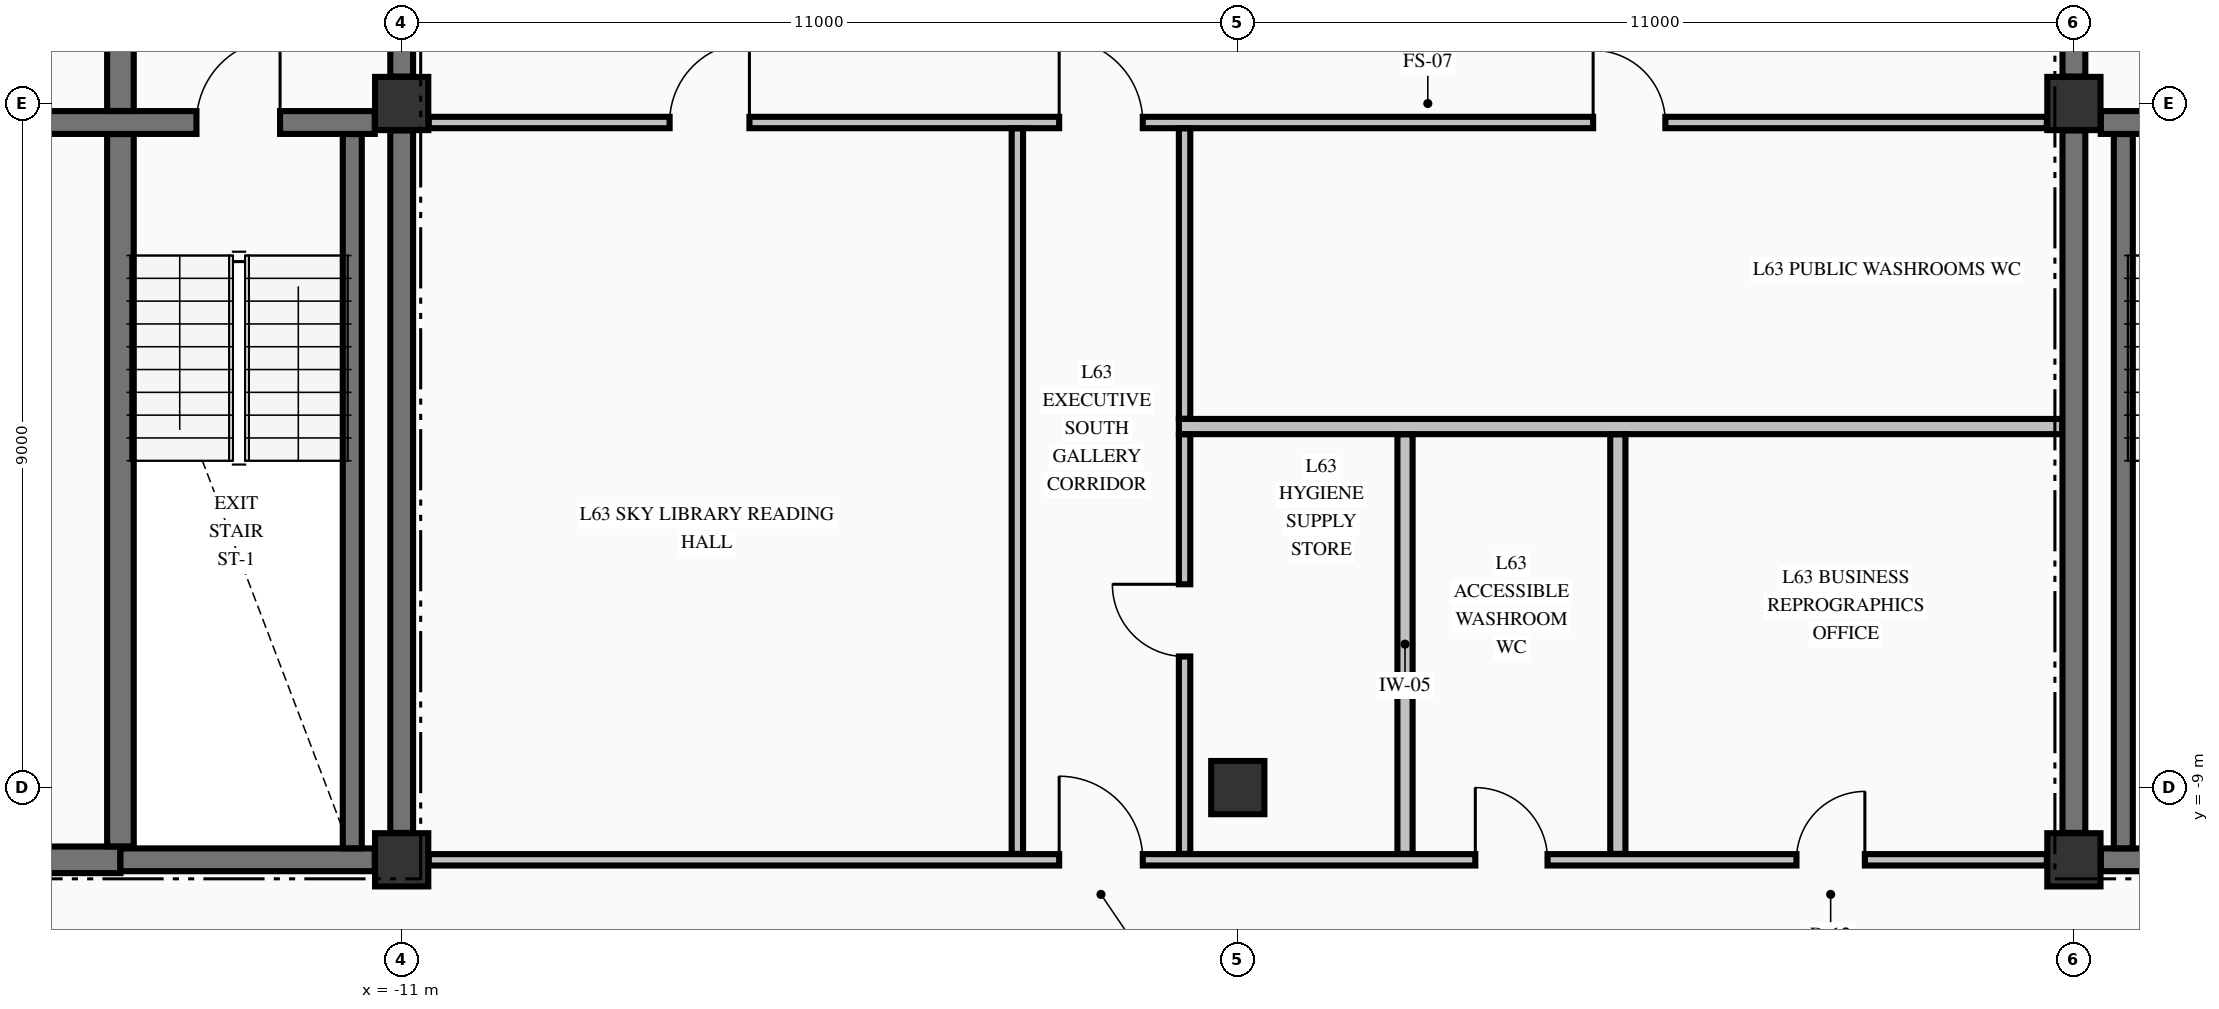
"""IFC4 building model, lengths in metres.
Left out: names, types, materials, properties, quantities, classifications, styles, units other than length and angle.
Written with IfcOpenShell. Run it as: python <this file> out.ifc"""

import sys

from ifc_helpers import new_model, si_unit, direction, frame, frame_2d, origin, origin_2d, place, context, subcontext, project, spatial, rectangle, extrude, element, fill, save


model = new_model("IFC4")
c1 = context("Model", 3, precision=1e-05, world=origin(), true_north=direction((0.0, 1.0)))
c2 = subcontext(c1, "Body", "Model", "MODEL_VIEW")
j1 = project(units=[si_unit("LENGTHUNIT", "METRE"), si_unit("PLANEANGLEUNIT", "RADIAN")], contexts=[c1])
p1 = place(None, origin())
s1 = spatial("IfcSite", under=j1, at=p1, CompositionType="ELEMENT")
p2 = place(p1, origin())
s2 = spatial("IfcBuilding", under=s1, at=p2, CompositionType="ELEMENT")
p3 = place(p2, frame((0.0, 0.0, 239.74)))
s3 = spatial("IfcBuildingStorey", under=s2, at=p3, CompositionType="ELEMENT", Elevation=239.74)
for number, where, z_axis, x_axis in (
    (1, (-11.0, -9.95, -0.25), (0.0, 0.0, 1.0), (1.0, 0.0, 0.0)),
    (2, (-11.0, 0.0, -0.25), (0.0, 0.0, 1.0), (1.0, 0.0, 0.0)),
    (3, (11.0, -9.95, -0.25), (0.0, 0.0, 1.0), (1.0, 0.0, 0.0)),
    (4, (11.0, 0.0, -0.25), (0.0, 0.0, 1.0), (1.0, 0.0, 0.0)),
    (5, (0.0, -9.0, -0.25), (0.0, 0.0, 1.0), (1.0, 0.0, 0.0)),
):
    element("IfcColumn", number, at=place(p3, frame(where, z_axis=z_axis, x_axis=x_axis)), inside=s3, PredefinedType="COLUMN", context=c2, shape_type="SweptSolid", body=[
        extrude(rectangle(XDim=0.7, YDim=0.7, at=origin_2d()), origin(), (0.0, 0.0, 1.0), 3.23),
    ])
p4 = place(p3, frame((-19.646, -9.95, 0.0), z_axis=(0.0, 0.0, 1.0), x_axis=(1.0, 0.0, 0.0)))
e6 = element("IfcWall", 6, at=p4, inside=s3, PredefinedType="SHEAR", context=c2, shape_type="SweptSolid", body=[
    extrude(rectangle(XDim=4.946, YDim=0.35, at=frame_2d((2.473, 0.0))), origin(), (0.0, 0.0, 1.0), 2.98),
])
p5 = place(p4, frame((0.821, 0.0, 0.0)))
e7 = element("IfcOpeningElement", 7, at=p5, cuts=e6, PredefinedType="OPENING", context=c2, shape_type="SweptSolid", body=[
    extrude(rectangle(XDim=1.05, YDim=2.15, at=frame_2d((0.525, 1.075))), frame((0.0, 0.185, 0.0), z_axis=(0.0, -1.0, 0.0), x_axis=(1.0, 0.0, 0.0)), (0.0, 0.0, 1.0), 0.37),
])
for number, where, z_axis, x_axis in (
    (8, (-14.7, -9.95, 0.0), (0.0, 0.0, 1.0), (1.0, 0.0, 0.0)),
    (9, (11.354, -9.95, 0.0), (0.0, 0.0, 1.0), (1.0, 0.0, 0.0)),
):
    element("IfcWall", number, at=place(p3, frame(where, z_axis=z_axis, x_axis=x_axis)), inside=s3, PredefinedType="SHEAR", context=c2, shape_type="SweptSolid", body=[
        extrude(rectangle(XDim=3.346, YDim=0.3, at=frame_2d((1.673, 0.0))), origin(), (0.0, 0.0, 1.0), 2.98),
    ])
p6 = place(p3, frame((-20.571, -0.25, 0.0), z_axis=(0.0, 0.0, 1.0), x_axis=(1.0, 0.0, 0.0)))
e10 = element("IfcWall", 10, at=p6, inside=s3, PredefinedType="SHEAR", context=c2, shape_type="SweptSolid", body=[
    extrude(rectangle(XDim=9.217, YDim=0.3, at=frame_2d((4.608, 0.0))), origin(), (0.0, 0.0, 1.0), 2.98),
])
p7 = place(p6, frame((6.871, 0.0, 0.0)))
e11 = element("IfcOpeningElement", 11, at=p7, cuts=e10, PredefinedType="OPENING", context=c2, shape_type="SweptSolid", body=[
    extrude(rectangle(XDim=1.1, YDim=2.15, at=frame_2d((0.55, 1.075))), frame((0.0, 0.16, 0.0), z_axis=(0.0, -1.0, 0.0), x_axis=(1.0, 0.0, 0.0)), (0.0, 0.0, 1.0), 0.32),
])
p8 = place(p3, frame((11.354, -0.25, 0.0), z_axis=(0.0, 0.0, 1.0), x_axis=(1.0, 0.0, 0.0)))
e12 = element("IfcWall", 12, at=p8, inside=s3, PredefinedType="SHEAR", context=c2, shape_type="SweptSolid", body=[
    extrude(rectangle(XDim=3.521, YDim=0.3, at=frame_2d((1.76, 0.0))), origin(), (0.0, 0.0, 1.0), 2.98),
])
p9 = place(p8, frame((1.246, 0.0, 0.0)))
e13 = element("IfcOpeningElement", 13, at=p9, cuts=e12, PredefinedType="OPENING", context=c2, shape_type="SweptSolid", body=[
    extrude(rectangle(XDim=1.1, YDim=2.15, at=frame_2d((0.55, 1.075))), frame((0.0, 0.16, 0.0), z_axis=(0.0, -1.0, 0.0), x_axis=(1.0, 0.0, 0.0)), (0.0, 0.0, 1.0), 0.32),
])
p10 = place(p3, frame((-10.644, -9.95, 0.0), z_axis=(0.0, 0.0, 1.0), x_axis=(1.0, 0.0, 0.0)))
e14 = element("IfcWall", 14, at=p10, inside=s3, PredefinedType="PARTITIONING", context=c2, shape_type="SweptSolid", body=[
    extrude(rectangle(XDim=21.288, YDim=0.15, at=frame_2d((10.644, 0.0))), origin(), (0.0, 0.0, 1.0), 2.98),
])
p11 = place(p10, frame((8.294, 0.0, 0.0)))
e15 = element("IfcOpeningElement", 15, at=p11, cuts=e14, PredefinedType="OPENING", context=c2, shape_type="SweptSolid", body=[
    extrude(rectangle(XDim=1.1, YDim=2.15, at=frame_2d((0.55, 1.075))), frame((0.0, 0.085, 0.0), z_axis=(0.0, -1.0, 0.0), x_axis=(1.0, 0.0, 0.0)), (0.0, 0.0, 1.0), 0.17),
])
p12 = place(p10, frame((13.769, 0.0, 0.0)))
e16 = element("IfcOpeningElement", 16, at=p12, cuts=e14, PredefinedType="OPENING", context=c2, shape_type="SweptSolid", body=[
    extrude(rectangle(XDim=0.95, YDim=2.15, at=frame_2d((0.475, 1.075))), frame((0.0, 0.085, 0.0), z_axis=(0.0, -1.0, 0.0), x_axis=(1.0, 0.0, 0.0)), (0.0, 0.0, 1.0), 0.17),
])
p13 = place(p10, frame((17.994, 0.0, 0.0)))
e17 = element("IfcOpeningElement", 17, at=p13, cuts=e14, PredefinedType="OPENING", context=c2, shape_type="SweptSolid", body=[
    extrude(rectangle(XDim=0.9, YDim=2.15, at=frame_2d((0.45, 1.075))), frame((0.0, 0.085, 0.0), z_axis=(0.0, -1.0, 0.0), x_axis=(1.0, 0.0, 0.0)), (0.0, 0.0, 1.0), 0.17),
])
p14 = place(p3, frame((-0.775, -4.25, 0.0), z_axis=(0.0, 0.0, 1.0), x_axis=(1.0, 0.0, 0.0)))
e18 = element("IfcWall", 18, at=p14, inside=s3, PredefinedType="PARTITIONING", context=c2, shape_type="SweptSolid", body=[
    extrude(rectangle(XDim=11.622, YDim=0.2, at=frame_2d((5.811, 0.0))), origin(), (0.0, 0.0, 1.0), 2.98),
])
p15 = place(p3, frame((-10.644, -0.25, 0.0), z_axis=(0.0, 0.0, 1.0), x_axis=(1.0, 0.0, 0.0)))
e19 = element("IfcWall", 19, at=p15, inside=s3, PredefinedType="PARTITIONING", context=c2, shape_type="SweptSolid", body=[
    extrude(rectangle(XDim=21.288, YDim=0.15, at=frame_2d((10.644, 0.0))), origin(), (0.0, 0.0, 1.0), 2.98),
])
p16 = place(p15, frame((8.294, 0.0, 0.0)))
e20 = element("IfcOpeningElement", 20, at=p16, cuts=e19, PredefinedType="OPENING", context=c2, shape_type="SweptSolid", body=[
    extrude(rectangle(XDim=1.1, YDim=2.15, at=frame_2d((0.55, 1.075))), frame((0.0, 0.085, 0.0), z_axis=(0.0, -1.0, 0.0), x_axis=(1.0, 0.0, 0.0)), (0.0, 0.0, 1.0), 0.17),
])
p17 = place(p15, frame((3.169, 0.0, 0.0)))
e21 = element("IfcOpeningElement", 21, at=p17, cuts=e19, PredefinedType="OPENING", context=c2, shape_type="SweptSolid", body=[
    extrude(rectangle(XDim=1.05, YDim=2.15, at=frame_2d((0.525, 1.075))), frame((0.0, 0.085, 0.0), z_axis=(0.0, -1.0, 0.0), x_axis=(1.0, 0.0, 0.0)), (0.0, 0.0, 1.0), 0.17),
])
p18 = place(p15, frame((15.319, 0.0, 0.0)))
e22 = element("IfcOpeningElement", 22, at=p18, cuts=e19, PredefinedType="OPENING", context=c2, shape_type="SweptSolid", body=[
    extrude(rectangle(XDim=0.95, YDim=2.15, at=frame_2d((0.475, 1.075))), frame((0.0, 0.085, 0.0), z_axis=(0.0, -1.0, 0.0), x_axis=(1.0, 0.0, 0.0)), (0.0, 0.0, 1.0), 0.17),
])
p19 = place(p3, frame((-14.7, -9.773, 0.0), z_axis=(0.0, 0.0, 1.0), x_axis=(0.0, 1.0, 0.0)))
e23 = element("IfcWall", 23, at=p19, inside=s3, PredefinedType="SHEAR", context=c2, shape_type="SweptSolid", body=[
    extrude(rectangle(XDim=9.371, YDim=0.35, at=frame_2d((4.686, 0.0))), origin(), (0.0, 0.0, 1.0), 2.98),
])
p20 = place(p3, frame((-14.7, -0.098, 0.0), z_axis=(0.0, 0.0, 1.0), x_axis=(0.0, 1.0, 0.0)))
e24 = element("IfcWall", 24, at=p20, inside=s3, PredefinedType="SHEAR", context=c2, shape_type="SweptSolid", body=[
    extrude(rectangle(XDim=2.846, YDim=0.35, at=frame_2d((1.423, 0.0))), origin(), (0.0, 0.0, 1.0), 2.98),
])
p21 = place(p3, frame((-11.65, -9.798, 0.0), z_axis=(0.0, 0.0, 1.0), x_axis=(0.0, 1.0, 0.0)))
e25 = element("IfcWall", 25, at=p21, inside=s3, PredefinedType="SOLIDWALL", context=c2, shape_type="SweptSolid", body=[
    extrude(rectangle(XDim=9.396, YDim=0.25, at=frame_2d((4.698, 0.0))), origin(), (0.0, 0.0, 1.0), 2.98),
])
p22 = place(p3, frame((-11.0, -9.596, 0.0), z_axis=(0.0, 0.0, 1.0), x_axis=(0.0, 1.0, 0.0)))
e26 = element("IfcWall", 26, at=p22, inside=s3, PredefinedType="SHEAR", context=c2, shape_type="SweptSolid", body=[
    extrude(rectangle(XDim=9.242, YDim=0.3, at=frame_2d((4.621, 0.0))), origin(), (0.0, 0.0, 1.0), 2.98),
])
p23 = place(p3, frame((-11.0, 0.354, 0.0), z_axis=(0.0, 0.0, 1.0), x_axis=(0.0, 1.0, 0.0)))
e27 = element("IfcWall", 27, at=p23, inside=s3, PredefinedType="SHEAR", context=c2, shape_type="SweptSolid", body=[
    extrude(rectangle(XDim=2.394, YDim=0.3, at=frame_2d((1.197, 0.0))), origin(), (0.0, 0.0, 1.0), 2.98),
])
p24 = place(p23, frame((0.746, 0.0, 0.0)))
e28 = element("IfcOpeningElement", 28, at=p24, cuts=e27, PredefinedType="OPENING", context=c2, shape_type="SweptSolid", body=[
    extrude(rectangle(XDim=1.1, YDim=2.15, at=frame_2d((0.55, 1.075))), frame((0.0, 0.16, 0.0), z_axis=(0.0, -1.0, 0.0), x_axis=(1.0, 0.0, 0.0)), (0.0, 0.0, 1.0), 0.32),
])
p25 = place(p3, frame((11.0, -9.596, 0.0), z_axis=(0.0, 0.0, 1.0), x_axis=(0.0, 1.0, 0.0)))
e29 = element("IfcWall", 29, at=p25, inside=s3, PredefinedType="SHEAR", context=c2, shape_type="SweptSolid", body=[
    extrude(rectangle(XDim=9.242, YDim=0.3, at=frame_2d((4.621, 0.0))), origin(), (0.0, 0.0, 1.0), 2.98),
])
p26 = place(p3, frame((11.0, 0.354, 0.0), z_axis=(0.0, 0.0, 1.0), x_axis=(0.0, 1.0, 0.0)))
e30 = element("IfcWall", 30, at=p26, inside=s3, PredefinedType="SHEAR", context=c2, shape_type="SweptSolid", body=[
    extrude(rectangle(XDim=2.394, YDim=0.3, at=frame_2d((1.197, 0.0))), origin(), (0.0, 0.0, 1.0), 2.98),
])
p27 = place(p26, frame((0.746, 0.0, 0.0)))
e31 = element("IfcOpeningElement", 31, at=p27, cuts=e30, PredefinedType="OPENING", context=c2, shape_type="SweptSolid", body=[
    extrude(rectangle(XDim=1.1, YDim=2.15, at=frame_2d((0.55, 1.075))), frame((0.0, 0.16, 0.0), z_axis=(0.0, -1.0, 0.0), x_axis=(1.0, 0.0, 0.0)), (0.0, 0.0, 1.0), 0.32),
])
p28 = place(p3, frame((11.65, -9.798, 0.0), z_axis=(0.0, 0.0, 1.0), x_axis=(0.0, 1.0, 0.0)))
e32 = element("IfcWall", 32, at=p28, inside=s3, PredefinedType="SOLIDWALL", context=c2, shape_type="SweptSolid", body=[
    extrude(rectangle(XDim=9.396, YDim=0.25, at=frame_2d((4.698, 0.0))), origin(), (0.0, 0.0, 1.0), 2.98),
])
p29 = place(p3, frame((-2.9, -9.872, 0.0), z_axis=(0.0, 0.0, 1.0), x_axis=(0.0, 1.0, 0.0)))
e33 = element("IfcWall", 33, at=p29, inside=s3, PredefinedType="PARTITIONING", context=c2, shape_type="SweptSolid", body=[
    extrude(rectangle(XDim=9.544, YDim=0.15, at=frame_2d((4.772, 0.0))), origin(), (0.0, 0.0, 1.0), 2.98),
])
p30 = place(p3, frame((-0.7, -9.872, 0.0), z_axis=(0.0, 0.0, 1.0), x_axis=(0.0, 1.0, 0.0)))
e34 = element("IfcWall", 34, at=p30, inside=s3, PredefinedType="PARTITIONING", context=c2, shape_type="SweptSolid", body=[
    extrude(rectangle(XDim=5.519, YDim=0.15, at=frame_2d((2.76, 0.0))), origin(), (0.0, 0.0, 1.0), 2.98),
])
p31 = place(p30, frame((2.597, 0.0, 0.0)))
e35 = element("IfcOpeningElement", 35, at=p31, cuts=e34, PredefinedType="OPENING", context=c2, shape_type="SweptSolid", body=[
    extrude(rectangle(XDim=0.95, YDim=2.15, at=frame_2d((0.475, 1.075))), frame((0.0, 0.085, 0.0), z_axis=(0.0, -1.0, 0.0), x_axis=(1.0, 0.0, 0.0)), (0.0, 0.0, 1.0), 0.17),
])
p32 = place(p3, frame((-0.7, -4.147, 0.0), z_axis=(0.0, 0.0, 1.0), x_axis=(0.0, 1.0, 0.0)))
e36 = element("IfcWall", 36, at=p32, inside=s3, PredefinedType="PARTITIONING", context=c2, shape_type="SweptSolid", body=[
    extrude(rectangle(XDim=3.819, YDim=0.15, at=frame_2d((1.91, 0.0))), origin(), (0.0, 0.0, 1.0), 2.98),
])
for number, where, z_axis, x_axis in (
    (37, (2.2, -9.872, 0.0), (0.0, 0.0, 1.0), (0.0, 1.0, 0.0)),
    (38, (5.0, -9.872, 0.0), (0.0, 0.0, 1.0), (0.0, 1.0, 0.0)),
):
    element("IfcWall", number, at=place(p3, frame(where, z_axis=z_axis, x_axis=x_axis)), inside=s3, PredefinedType="PARTITIONING", context=c2, shape_type="SweptSolid", body=[
        extrude(rectangle(XDim=5.519, YDim=0.2, at=frame_2d((2.76, 0.0))), origin(), (0.0, 0.0, 1.0), 2.98),
    ])
p33 = place(p7, origin())
e39 = element("IfcDoor", 39, at=p33, inside=s3, OperationType="SINGLE_SWING_RIGHT", PredefinedType="DOOR", context=c2, shape_type="SweptSolid", body=[
    extrude(rectangle(XDim=1.1, YDim=2.15, at=frame_2d((0.55, 1.075))), frame((0.0, 0.025, 0.0), z_axis=(0.0, -1.0, 0.0), x_axis=(1.0, 0.0, 0.0)), (0.0, 0.0, 1.0), 0.05),
])
fill(e11, e39)
p34 = place(p11, origin())
e40 = element("IfcDoor", 40, at=p34, inside=s3, OperationType="SINGLE_SWING_LEFT", PredefinedType="DOOR", context=c2, shape_type="SweptSolid", body=[
    extrude(rectangle(XDim=1.1, YDim=2.15, at=frame_2d((0.55, 1.075))), frame((0.0, 0.025, 0.0), z_axis=(0.0, -1.0, 0.0), x_axis=(1.0, 0.0, 0.0)), (0.0, 0.0, 1.0), 0.05),
])
fill(e15, e40)
p35 = place(p16, origin())
e41 = element("IfcDoor", 41, at=p35, inside=s3, OperationType="SINGLE_SWING_LEFT", PredefinedType="DOOR", context=c2, shape_type="SweptSolid", body=[
    extrude(rectangle(XDim=1.1, YDim=2.15, at=frame_2d((0.55, 1.075))), frame((0.0, 0.025, 0.0), z_axis=(0.0, -1.0, 0.0), x_axis=(1.0, 0.0, 0.0)), (0.0, 0.0, 1.0), 0.05),
])
fill(e20, e41)
p36 = place(p17, origin())
e42 = element("IfcDoor", 42, at=p36, inside=s3, OperationType="SINGLE_SWING_RIGHT", PredefinedType="DOOR", context=c2, shape_type="SweptSolid", body=[
    extrude(rectangle(XDim=1.05, YDim=2.15, at=frame_2d((0.525, 1.075))), frame((0.0, 0.025, 0.0), z_axis=(0.0, -1.0, 0.0), x_axis=(1.0, 0.0, 0.0)), (0.0, 0.0, 1.0), 0.05),
])
fill(e21, e42)
p37 = place(p18, origin())
e43 = element("IfcDoor", 43, at=p37, inside=s3, OperationType="SINGLE_SWING_LEFT", PredefinedType="DOOR", context=c2, shape_type="SweptSolid", body=[
    extrude(rectangle(XDim=0.95, YDim=2.15, at=frame_2d((0.475, 1.075))), frame((0.0, 0.025, 0.0), z_axis=(0.0, -1.0, 0.0), x_axis=(1.0, 0.0, 0.0)), (0.0, 0.0, 1.0), 0.05),
])
fill(e22, e43)
p38 = place(p31, origin())
e44 = element("IfcDoor", 44, at=p38, inside=s3, OperationType="SINGLE_SWING_RIGHT", PredefinedType="DOOR", context=c2, shape_type="SweptSolid", body=[
    extrude(rectangle(XDim=0.95, YDim=2.15, at=frame_2d((0.475, 1.075))), frame((0.0, 0.025, 0.0), z_axis=(0.0, -1.0, 0.0), x_axis=(1.0, 0.0, 0.0)), (0.0, 0.0, 1.0), 0.05),
])
fill(e35, e44)
p39 = place(p12, origin())
e45 = element("IfcDoor", 45, at=p39, inside=s3, OperationType="SINGLE_SWING_LEFT", PredefinedType="DOOR", context=c2, shape_type="SweptSolid", body=[
    extrude(rectangle(XDim=0.95, YDim=2.15, at=frame_2d((0.475, 1.075))), frame((0.0, 0.025, 0.0), z_axis=(0.0, -1.0, 0.0), x_axis=(1.0, 0.0, 0.0)), (0.0, 0.0, 1.0), 0.05),
])
fill(e16, e45)
p40 = place(p13, origin())
e46 = element("IfcDoor", 46, at=p40, inside=s3, OperationType="SINGLE_SWING_RIGHT", PredefinedType="DOOR", context=c2, shape_type="SweptSolid", body=[
    extrude(rectangle(XDim=0.9, YDim=2.15, at=frame_2d((0.45, 1.075))), frame((0.0, 0.025, 0.0), z_axis=(0.0, -1.0, 0.0), x_axis=(1.0, 0.0, 0.0)), (0.0, 0.0, 1.0), 0.05),
])
fill(e17, e46)
save(model, sys.argv[1])
